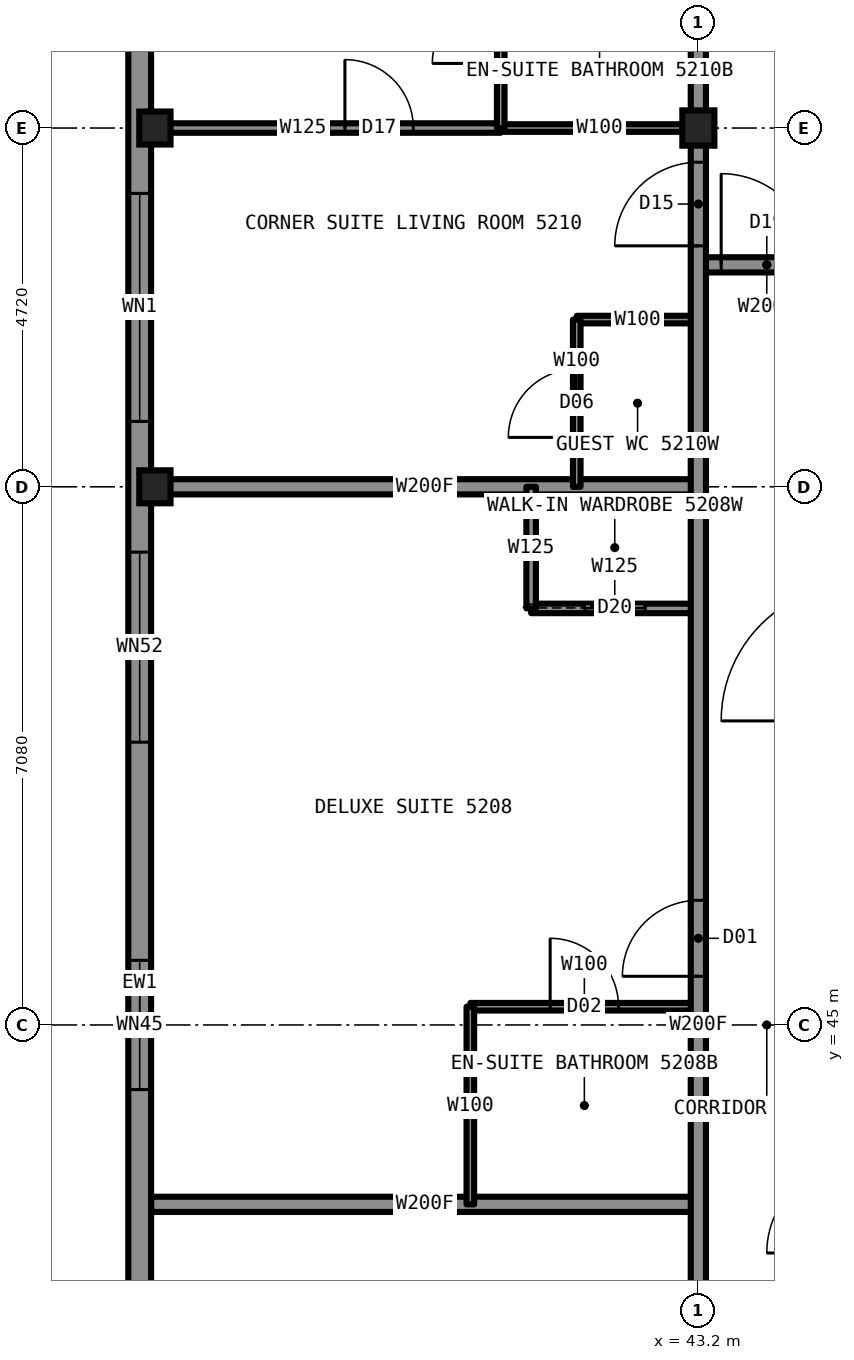
"""IFC4 building model, lengths in metres.
Left out: names, types, materials, properties, quantities, classifications, styles, units other than length and angle.
Written with IfcOpenShell. Run it as: python <this file> out.ifc"""

import sys

from ifc_helpers import new_model, si_unit, direction, frame, frame_2d, origin, origin_2d, place, context, subcontext, project, spatial, rectangle, i_section, extrude, element, fill, save


model = new_model("IFC4")
c1 = context("Model", 3, precision=1e-05, world=origin(), true_north=direction((0.0, 1.0)))
c2 = subcontext(c1, "Body", "Model", "MODEL_VIEW")
j1 = project(units=[si_unit("LENGTHUNIT", "METRE"), si_unit("PLANEANGLEUNIT", "RADIAN")], contexts=[c1])
p1 = place(None, origin())
s1 = spatial("IfcSite", under=j1, at=p1, CompositionType="ELEMENT")
p2 = place(p1, origin())
s2 = spatial("IfcBuilding", under=s1, at=p2, CompositionType="ELEMENT")
p3 = place(p2, frame((0.0, 0.0, 193.3)))
s3 = spatial("IfcBuildingStorey", under=s2, at=p3, CompositionType="ELEMENT", Elevation=193.3)
for number, where, z_axis, x_axis in (
    (1, (36.05, 52.08, 0.0), (0.0, 0.0, 1.0), (1.0, 0.0, 0.0)),
    (2, (36.05, 56.8, 0.0), (0.0, 0.0, 1.0), (1.0, 0.0, 0.0)),
):
    element("IfcColumn", number, at=place(p3, frame(where, z_axis=z_axis, x_axis=x_axis)), inside=s3, PredefinedType="COLUMN", context=c2, shape_type="SweptSolid", body=[
        extrude(i_section(OverallWidth=0.411, OverallDepth=0.434, WebThickness=0.036, FlangeThickness=0.057, at=origin_2d()), origin(), (0.0, 0.0, 1.0), 3.5),
    ])
p4 = place(p3, frame((43.2, 56.8, 0.0), z_axis=(0.0, 0.0, 1.0), x_axis=(1.0, 0.0, 0.0)))
e3 = element("IfcColumn", 3, at=p4, inside=s3, PredefinedType="COLUMN", context=c2, shape_type="SweptSolid", body=[
    extrude(i_section(OverallWidth=0.422, OverallDepth=0.465, WebThickness=0.045, FlangeThickness=0.073, at=origin_2d()), origin(), (0.0, 0.0, 1.0), 3.5),
])
p5 = place(p3, frame((36.0, 42.64, 0.0), z_axis=(0.0, 0.0, 1.0), x_axis=(1.0, 0.0, 0.0)))
e4 = element("IfcWall", 4, at=p5, inside=s3, PredefinedType="PARTITIONING", context=c2, shape_type="SweptSolid", body=[
    extrude(rectangle(XDim=7.2, YDim=0.2, at=frame_2d((3.6, 0.0))), origin(), (0.0, 0.0, 1.0), 2.73),
])
p6 = place(p3, frame((40.2, 45.24, 0.0), z_axis=(0.0, 0.0, 1.0), x_axis=(1.0, 0.0, 0.0)))
e5 = element("IfcWall", 5, at=p6, inside=s3, PredefinedType="PARTITIONING", context=c2, shape_type="SweptSolid", body=[
    extrude(rectangle(XDim=3.0, YDim=0.1, at=frame_2d((1.5, 0.0))), origin(), (0.0, 0.0, 1.0), 3.33),
])
p7 = place(p6, frame((1.05, 0.0, 0.0)))
e6 = element("IfcOpeningElement", 6, at=p7, cuts=e5, PredefinedType="OPENING", context=c2, shape_type="SweptSolid", body=[
    extrude(rectangle(XDim=0.9, YDim=2.1, at=frame_2d((0.45, 1.05))), frame((0.0, 0.06, 0.0), z_axis=(0.0, -1.0, 0.0), x_axis=(1.0, 0.0, 0.0)), (0.0, 0.0, 1.0), 0.12),
])
p8 = place(p3, frame((43.2, 55.0, 0.0), z_axis=(0.0, 0.0, 1.0), x_axis=(1.0, 0.0, 0.0)))
e7 = element("IfcWall", 7, at=p8, inside=s3, PredefinedType="PARTITIONING", context=c2, shape_type="SweptSolid", body=[
    extrude(rectangle(XDim=1.8, YDim=0.2, at=frame_2d((0.9, 0.0))), origin(), (0.0, 0.0, 1.0), 3.33),
])
p9 = place(p8, frame((0.3, 0.0, 0.0)))
e8 = element("IfcOpeningElement", 8, at=p9, cuts=e7, PredefinedType="OPENING", context=c2, shape_type="SweptSolid", body=[
    extrude(rectangle(XDim=1.2, YDim=2.2, at=frame_2d((0.6, 1.1))), frame((0.0, 0.11, 0.0), z_axis=(0.0, -1.0, 0.0), x_axis=(1.0, 0.0, 0.0)), (0.0, 0.0, 1.0), 0.22),
])
p10 = place(p3, frame((40.6, 56.8, 0.0), z_axis=(0.0, 0.0, 1.0), x_axis=(1.0, 0.0, 0.0)))
e9 = element("IfcWall", 9, at=p10, inside=s3, PredefinedType="PARTITIONING", context=c2, shape_type="SweptSolid", body=[
    extrude(rectangle(XDim=2.6, YDim=0.1, at=frame_2d((1.3, 0.0))), origin(), (0.0, 0.0, 1.0), 2.573),
])
p11 = place(p3, frame((36.0, 56.8, 0.0), z_axis=(0.0, 0.0, 1.0), x_axis=(1.0, 0.0, 0.0)))
e10 = element("IfcWall", 10, at=p11, inside=s3, PredefinedType="PARTITIONING", context=c2, shape_type="SweptSolid", body=[
    extrude(rectangle(XDim=4.6, YDim=0.125, at=frame_2d((2.3, 0.0))), origin(), (0.0, 0.0, 1.0), 2.573),
])
p12 = place(p11, frame((2.55, 0.0, 0.0)))
e11 = element("IfcOpeningElement", 11, at=p12, cuts=e10, PredefinedType="OPENING", context=c2, shape_type="SweptSolid", body=[
    extrude(rectangle(XDim=0.9, YDim=2.2, at=frame_2d((0.45, 1.1))), frame((0.0, 0.073, 0.0), z_axis=(0.0, -1.0, 0.0), x_axis=(1.0, 0.0, 0.0)), (0.0, 0.0, 1.0), 0.145),
])
p13 = place(p3, frame((41.0, 50.48, 0.0), z_axis=(0.0, 0.0, 1.0), x_axis=(1.0, 0.0, 0.0)))
e12 = element("IfcWall", 12, at=p13, inside=s3, PredefinedType="PARTITIONING", context=c2, shape_type="SweptSolid", body=[
    extrude(rectangle(XDim=2.2, YDim=0.125, at=frame_2d((1.1, 0.0))), origin(), (0.0, 0.0, 1.0), 3.33),
])
p14 = place(p13, frame((0.7, 0.0, 0.0)))
e13 = element("IfcOpeningElement", 13, at=p14, cuts=e12, PredefinedType="OPENING", context=c2, shape_type="SweptSolid", body=[
    extrude(rectangle(XDim=0.8, YDim=2.1, at=frame_2d((0.4, 1.05))), frame((0.0, 0.073, 0.0), z_axis=(0.0, -1.0, 0.0), x_axis=(1.0, 0.0, 0.0)), (0.0, 0.0, 1.0), 0.145),
])
p15 = place(p3, frame((36.0, 52.08, 0.0), z_axis=(0.0, 0.0, 1.0), x_axis=(1.0, 0.0, 0.0)))
e14 = element("IfcWall", 14, at=p15, inside=s3, PredefinedType="PARTITIONING", context=c2, shape_type="SweptSolid", body=[
    extrude(rectangle(XDim=7.2, YDim=0.2, at=frame_2d((3.6, 0.0))), origin(), (0.0, 0.0, 1.0), 2.573),
])
p16 = place(p3, frame((41.6, 54.28, 0.0), z_axis=(0.0, 0.0, 1.0), x_axis=(1.0, 0.0, 0.0)))
e15 = element("IfcWall", 15, at=p16, inside=s3, PredefinedType="PARTITIONING", context=c2, shape_type="SweptSolid", body=[
    extrude(rectangle(XDim=1.6, YDim=0.1, at=frame_2d((0.8, 0.0))), origin(), (0.0, 0.0, 1.0), 3.33),
])
p17 = place(p3, frame((43.2, 33.22, 0.0), z_axis=(0.0, 0.0, 1.0), x_axis=(0.0, 1.0, 0.0)))
e16 = element("IfcWall", 16, at=p17, inside=s3, PredefinedType="PARTITIONING", context=c2, shape_type="SweptSolid", body=[
    extrude(rectangle(XDim=23.56, YDim=0.2, at=frame_2d((11.78, 0.0))), origin(), (0.0, 0.0, 1.0), 3.33),
])
p18 = place(p17, frame((7.25, 0.0, 0.0)))
e17 = element("IfcOpeningElement", 17, at=p18, cuts=e16, PredefinedType="OPENING", context=c2, shape_type="SweptSolid", body=[
    extrude(rectangle(XDim=1.0, YDim=2.2, at=frame_2d((0.5, 1.1))), frame((0.0, 0.11, 0.0), z_axis=(0.0, -1.0, 0.0), x_axis=(1.0, 0.0, 0.0)), (0.0, 0.0, 1.0), 0.22),
])
p19 = place(p17, frame((12.42, 0.0, 0.0)))
e18 = element("IfcOpeningElement", 18, at=p19, cuts=e16, PredefinedType="OPENING", context=c2, shape_type="SweptSolid", body=[
    extrude(rectangle(XDim=1.0, YDim=2.2, at=frame_2d((0.5, 1.1))), frame((0.0, 0.11, 0.0), z_axis=(0.0, -1.0, 0.0), x_axis=(1.0, 0.0, 0.0)), (0.0, 0.0, 1.0), 0.22),
])
p20 = place(p17, frame((22.03, 0.0, 0.0)))
e19 = element("IfcOpeningElement", 19, at=p20, cuts=e16, PredefinedType="OPENING", context=c2, shape_type="SweptSolid", body=[
    extrude(rectangle(XDim=1.1, YDim=2.2, at=frame_2d((0.55, 1.1))), frame((0.0, 0.11, 0.0), z_axis=(0.0, -1.0, 0.0), x_axis=(1.0, 0.0, 0.0)), (0.0, 0.0, 1.0), 0.22),
])
p21 = place(p17, frame((0.63, 0.0, 0.0)))
e20 = element("IfcOpeningElement", 20, at=p21, cuts=e16, PredefinedType="OPENING", context=c2, shape_type="SweptSolid", body=[
    extrude(rectangle(XDim=1.1, YDim=2.2, at=frame_2d((0.55, 1.1))), frame((0.0, 0.11, 0.0), z_axis=(0.0, -1.0, 0.0), x_axis=(1.0, 0.0, 0.0)), (0.0, 0.0, 1.0), 0.22),
])
p22 = place(p3, frame((41.6, 52.08, 0.0), z_axis=(0.0, 0.0, 1.0), x_axis=(0.0, 1.0, 0.0)))
e21 = element("IfcWall", 21, at=p22, inside=s3, PredefinedType="PARTITIONING", context=c2, shape_type="SweptSolid", body=[
    extrude(rectangle(XDim=2.2, YDim=0.1, at=frame_2d((1.1, 0.0))), origin(), (0.0, 0.0, 1.0), 3.33),
])
p23 = place(p22, frame((0.65, 0.0, 0.0)))
e22 = element("IfcOpeningElement", 22, at=p23, cuts=e21, PredefinedType="OPENING", context=c2, shape_type="SweptSolid", body=[
    extrude(rectangle(XDim=0.9, YDim=2.1, at=frame_2d((0.45, 1.05))), frame((0.0, 0.06, 0.0), z_axis=(0.0, -1.0, 0.0), x_axis=(1.0, 0.0, 0.0)), (0.0, 0.0, 1.0), 0.12),
])
p24 = place(p3, frame((41.0, 50.48, 0.0), z_axis=(0.0, 0.0, 1.0), x_axis=(0.0, 1.0, 0.0)))
e23 = element("IfcWall", 23, at=p24, inside=s3, PredefinedType="PARTITIONING", context=c2, shape_type="SweptSolid", body=[
    extrude(rectangle(XDim=1.6, YDim=0.125, at=frame_2d((0.8, 0.0))), origin(), (0.0, 0.0, 1.0), 3.33),
])
p25 = place(p3, frame((40.6, 56.8, 0.0), z_axis=(0.0, 0.0, 1.0), x_axis=(0.0, 1.0, 0.0)))
e24 = element("IfcWall", 24, at=p25, inside=s3, PredefinedType="PARTITIONING", context=c2, shape_type="SweptSolid", body=[
    extrude(rectangle(XDim=2.6, YDim=0.1, at=frame_2d((1.3, 0.0))), origin(), (0.0, 0.0, 1.0), 3.33),
])
p26 = place(p25, frame((0.85, 0.0, 0.0)))
e25 = element("IfcOpeningElement", 25, at=p26, cuts=e24, PredefinedType="OPENING", context=c2, shape_type="SweptSolid", body=[
    extrude(rectangle(XDim=0.9, YDim=2.1, at=frame_2d((0.45, 1.05))), frame((0.0, 0.06, 0.0), z_axis=(0.0, -1.0, 0.0), x_axis=(1.0, 0.0, 0.0)), (0.0, 0.0, 1.0), 0.12),
])
p27 = place(p3, frame((40.2, 42.64, 0.0), z_axis=(0.0, 0.0, 1.0), x_axis=(0.0, 1.0, 0.0)))
e26 = element("IfcWall", 26, at=p27, inside=s3, PredefinedType="PARTITIONING", context=c2, shape_type="SweptSolid", body=[
    extrude(rectangle(XDim=2.6, YDim=0.1, at=frame_2d((1.3, 0.0))), origin(), (0.0, 0.0, 1.0), 3.33),
])
p28 = place(p3, frame((35.85, 58.8, 0.0), z_axis=(0.0, 0.0, 1.0), x_axis=(0.0, -1.0, 0.0)))
e27 = element("IfcWall", 27, at=p28, inside=s3, PredefinedType="SOLIDWALL", context=c2, shape_type="SweptSolid", body=[
    extrude(rectangle(XDim=27.6, YDim=0.3, at=frame_2d((13.8, 0.0))), origin(), (0.0, 0.0, 1.0), 2.83),
])
p29 = place(p28, frame((2.86, 0.0, 0.3)))
e28 = element("IfcOpeningElement", 28, at=p29, cuts=e27, PredefinedType="OPENING", context=c2, shape_type="SweptSolid", body=[
    extrude(rectangle(XDim=3.0, YDim=2.0, at=frame_2d((1.5, 1.0))), frame((0.0, 0.16, 0.0), z_axis=(0.0, -1.0, 0.0), x_axis=(1.0, 0.0, 0.0)), (0.0, 0.0, 1.0), 0.32),
])
p30 = place(p28, frame((7.58, 0.0, 0.3)))
e29 = element("IfcOpeningElement", 29, at=p30, cuts=e27, PredefinedType="OPENING", context=c2, shape_type="SweptSolid", body=[
    extrude(rectangle(XDim=2.5, YDim=2.0, at=frame_2d((1.25, 1.0))), frame((0.0, 0.16, 0.0), z_axis=(0.0, -1.0, 0.0), x_axis=(1.0, 0.0, 0.0)), (0.0, 0.0, 1.0), 0.32),
])
p31 = place(p28, frame((12.95, 0.0, 1.0)))
e30 = element("IfcOpeningElement", 30, at=p31, cuts=e27, PredefinedType="OPENING", context=c2, shape_type="SweptSolid", body=[
    extrude(rectangle(XDim=1.7, YDim=1.3, at=frame_2d((0.85, 0.65))), frame((0.0, 0.16, 0.0), z_axis=(0.0, -1.0, 0.0), x_axis=(1.0, 0.0, 0.0)), (0.0, 0.0, 1.0), 0.32),
])
p32 = place(p28, frame((17.52, 0.0, 0.3)))
e31 = element("IfcOpeningElement", 31, at=p32, cuts=e27, PredefinedType="OPENING", context=c2, shape_type="SweptSolid", body=[
    extrude(rectangle(XDim=2.5, YDim=2.0, at=frame_2d((1.25, 1.0))), frame((0.0, 0.16, 0.0), z_axis=(0.0, -1.0, 0.0), x_axis=(1.0, 0.0, 0.0)), (0.0, 0.0, 1.0), 0.32),
])
p33 = place(p28, frame((21.74, 0.0, 0.3)))
e32 = element("IfcOpeningElement", 32, at=p33, cuts=e27, PredefinedType="OPENING", context=c2, shape_type="SweptSolid", body=[
    extrude(rectangle(XDim=3.0, YDim=2.0, at=frame_2d((1.5, 1.0))), frame((0.0, 0.16, 0.0), z_axis=(0.0, -1.0, 0.0), x_axis=(1.0, 0.0, 0.0)), (0.0, 0.0, 1.0), 0.32),
])
p34 = place(p3, frame((43.2, 56.78, 0.0), z_axis=(0.0, 0.0, 1.0), x_axis=(0.0, 1.0, 0.0)))
e33 = element("IfcWall", 33, at=p34, inside=s3, PredefinedType="PARTITIONING", context=c2, shape_type="SweptSolid", body=[
    extrude(rectangle(XDim=2.62, YDim=0.2, at=frame_2d((1.31, 0.0))), origin(), (0.0, 0.0, 1.0), 2.573),
])
p35 = place(p9, origin())
e34 = element("IfcDoor", 34, at=p35, inside=s3, OperationType="SINGLE_SWING_LEFT", PredefinedType="DOOR", context=c2, shape_type="SweptSolid", body=[
    extrude(rectangle(XDim=1.2, YDim=2.2, at=frame_2d((0.6, 1.1))), frame((0.0, 0.025, 0.0), z_axis=(0.0, -1.0, 0.0), x_axis=(1.0, 0.0, 0.0)), (0.0, 0.0, 1.0), 0.05),
])
fill(e8, e34)
p36 = place(p19, origin())
e35 = element("IfcDoor", 35, at=p36, inside=s3, OperationType="SINGLE_SWING_LEFT", PredefinedType="DOOR", context=c2, shape_type="SweptSolid", body=[
    extrude(rectangle(XDim=1.0, YDim=2.2, at=frame_2d((0.5, 1.1))), frame((0.0, 0.025, 0.0), z_axis=(0.0, -1.0, 0.0), x_axis=(1.0, 0.0, 0.0)), (0.0, 0.0, 1.0), 0.05),
])
fill(e18, e35)
p37 = place(p7, origin())
e36 = element("IfcDoor", 36, at=p37, inside=s3, OperationType="SINGLE_SWING_RIGHT", PredefinedType="DOOR", context=c2, shape_type="SweptSolid", body=[
    extrude(rectangle(XDim=0.9, YDim=2.1, at=frame_2d((0.45, 1.05))), frame((0.0, 0.025, 0.0), z_axis=(0.0, -1.0, 0.0), x_axis=(1.0, 0.0, 0.0)), (0.0, 0.0, 1.0), 0.05),
])
fill(e6, e36)
p38 = place(p14, origin())
e37 = element("IfcDoor", 37, at=p38, inside=s3, OperationType="SLIDING_TO_LEFT", PredefinedType="DOOR", context=c2, shape_type="SweptSolid", body=[
    extrude(rectangle(XDim=0.8, YDim=2.1, at=frame_2d((0.4, 1.05))), frame((0.0, 0.025, 0.0), z_axis=(0.0, -1.0, 0.0), x_axis=(1.0, 0.0, 0.0)), (0.0, 0.0, 1.0), 0.05),
])
fill(e13, e37)
p39 = place(p20, origin())
e38 = element("IfcDoor", 38, at=p39, inside=s3, OperationType="SINGLE_SWING_LEFT", PredefinedType="DOOR", context=c2, shape_type="SweptSolid", body=[
    extrude(rectangle(XDim=1.1, YDim=2.2, at=frame_2d((0.55, 1.1))), frame((0.0, 0.025, 0.0), z_axis=(0.0, -1.0, 0.0), x_axis=(1.0, 0.0, 0.0)), (0.0, 0.0, 1.0), 0.05),
])
fill(e19, e38)
p40 = place(p26, origin())
e39 = element("IfcDoor", 39, at=p40, inside=s3, OperationType="SINGLE_SWING_RIGHT", PredefinedType="DOOR", context=c2, shape_type="SweptSolid", body=[
    extrude(rectangle(XDim=0.9, YDim=2.1, at=frame_2d((0.45, 1.05))), frame((0.0, 0.025, 0.0), z_axis=(0.0, -1.0, 0.0), x_axis=(1.0, 0.0, 0.0)), (0.0, 0.0, 1.0), 0.05),
])
fill(e25, e39)
p41 = place(p12, origin())
e40 = element("IfcDoor", 40, at=p41, inside=s3, OperationType="SINGLE_SWING_LEFT", PredefinedType="DOOR", context=c2, shape_type="SweptSolid", body=[
    extrude(rectangle(XDim=0.9, YDim=2.2, at=frame_2d((0.45, 1.1))), frame((0.0, 0.025, 0.0), z_axis=(0.0, -1.0, 0.0), x_axis=(1.0, 0.0, 0.0)), (0.0, 0.0, 1.0), 0.05),
])
fill(e11, e40)
p42 = place(p23, origin())
e41 = element("IfcDoor", 41, at=p42, inside=s3, OperationType="SINGLE_SWING_LEFT", PredefinedType="DOOR", context=c2, shape_type="SweptSolid", body=[
    extrude(rectangle(XDim=0.9, YDim=2.1, at=frame_2d((0.45, 1.05))), frame((0.0, 0.025, 0.0), z_axis=(0.0, -1.0, 0.0), x_axis=(1.0, 0.0, 0.0)), (0.0, 0.0, 1.0), 0.05),
])
fill(e22, e41)
p43 = place(p29, origin())
e42 = element("IfcWindow", 42, at=p43, inside=s3, PartitioningType="SINGLE_PANEL", PredefinedType="WINDOW", context=c2, shape_type="SweptSolid", body=[
    extrude(rectangle(XDim=3.0, YDim=2.0, at=frame_2d((1.5, 1.0))), frame((0.0, 0.13, 0.0), z_axis=(0.0, -1.0, 0.0), x_axis=(1.0, 0.0, 0.0)), (0.0, 0.0, 1.0), 0.06),
])
fill(e28, e42)
p44 = place(p30, origin())
e43 = element("IfcWindow", 43, at=p44, inside=s3, PartitioningType="SINGLE_PANEL", PredefinedType="WINDOW", context=c2, shape_type="SweptSolid", body=[
    extrude(rectangle(XDim=2.5, YDim=2.0, at=frame_2d((1.25, 1.0))), frame((0.0, 0.13, 0.0), z_axis=(0.0, -1.0, 0.0), x_axis=(1.0, 0.0, 0.0)), (0.0, 0.0, 1.0), 0.06),
])
fill(e29, e43)
p45 = place(p31, origin())
e44 = element("IfcWindow", 44, at=p45, inside=s3, PartitioningType="SINGLE_PANEL", PredefinedType="WINDOW", context=c2, shape_type="SweptSolid", body=[
    extrude(rectangle(XDim=1.7, YDim=1.3, at=frame_2d((0.85, 0.65))), frame((0.0, 0.13, 0.0), z_axis=(0.0, -1.0, 0.0), x_axis=(1.0, 0.0, 0.0)), (0.0, 0.0, 1.0), 0.06),
])
fill(e30, e44)
save(model, sys.argv[1])
